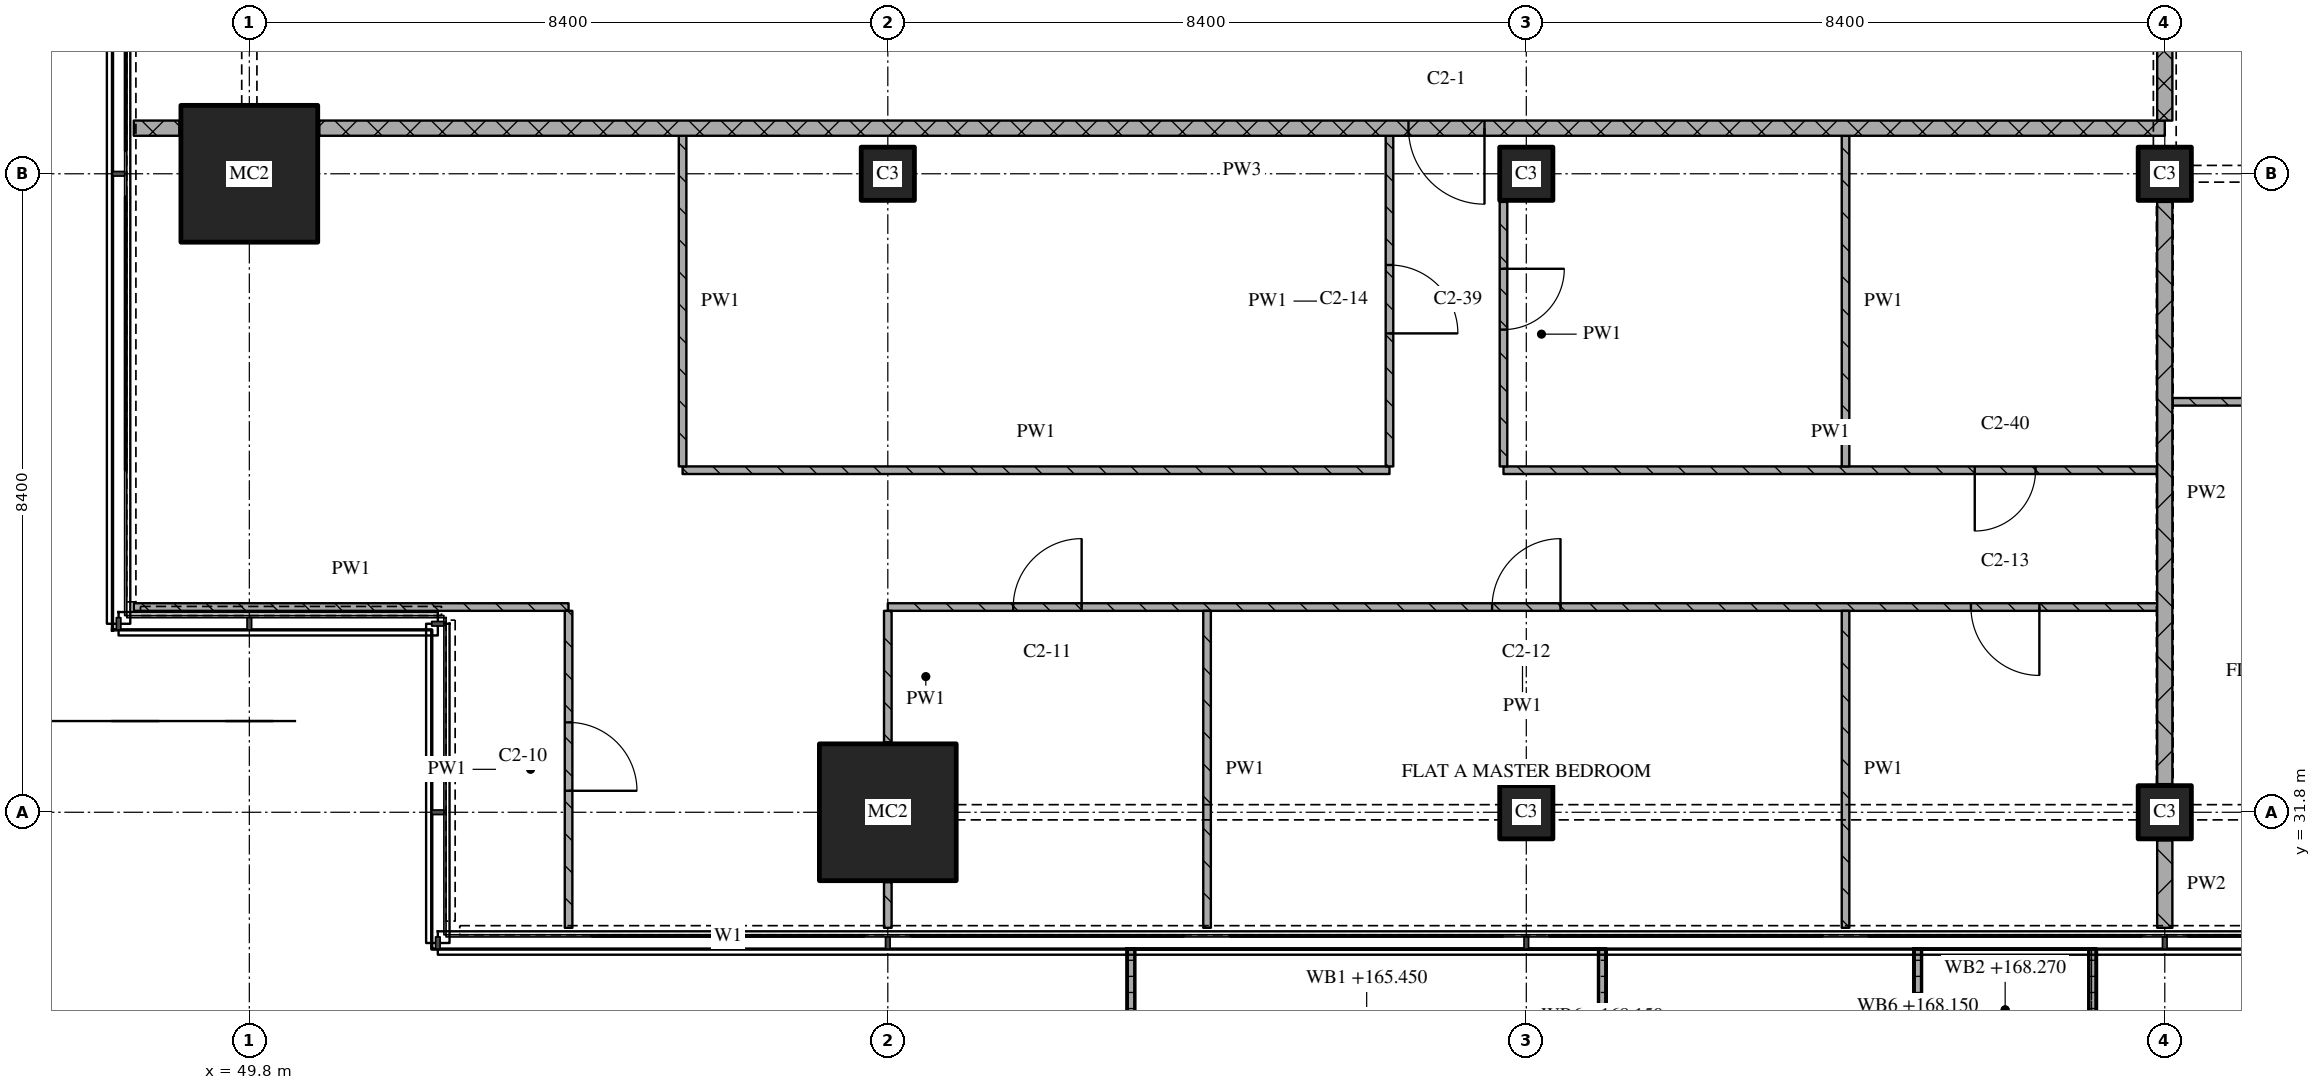
"""IFC4 building model, lengths in metres.
Left out: names, types, materials, properties, quantities, classifications, styles, units other than length and angle.
Written with IfcOpenShell. Run it as: python <this file> out.ifc"""

import sys

from ifc_helpers import new_model, si_unit, direction, frame, frame_2d, origin, origin_2d, place, context, subcontext, project, spatial, polyline, rectangle, outline, extrude, element, fill, save


model = new_model("IFC4")
c1 = context("Model", 3, precision=1e-05, world=origin(), true_north=direction((0.0, 1.0)))
c2 = subcontext(c1, "Body", "Model", "MODEL_VIEW")
j1 = project(units=[si_unit("LENGTHUNIT", "METRE"), si_unit("PLANEANGLEUNIT", "RADIAN")], contexts=[c1])
p1 = place(None, origin())
s1 = spatial("IfcSite", under=j1, at=p1, CompositionType="ELEMENT")
p2 = place(p1, origin())
s2 = spatial("IfcBuilding", under=s1, at=p2, CompositionType="ELEMENT")
p3 = place(p2, frame((0.0, 0.0, 165.45)))
s3 = spatial("IfcBuildingStorey", under=s2, at=p3, CompositionType="ELEMENT", Elevation=165.45)
for number, where, z_axis, x_axis in (
    (1, (49.8, 40.2, 0.0), (0.0, 0.0, 1.0), (1.0, 0.0, 0.0)),
    (2, (58.2, 31.8, 0.0), (0.0, 0.0, 1.0), (1.0, 0.0, 0.0)),
):
    element("IfcColumn", number, at=place(p3, frame(where, z_axis=z_axis, x_axis=x_axis)), inside=s3, PredefinedType="COLUMN", context=c2, shape_type="SweptSolid", body=[
        extrude(rectangle(XDim=1.8, YDim=1.8, at=origin_2d()), origin(), (0.0, 0.0, 1.0), 3.6),
    ])
for number, where, z_axis, x_axis in (
    (3, (58.2, 40.2, 0.0), (0.0, 0.0, 1.0), (1.0, 0.0, 0.0)),
    (4, (66.6, 31.8, 0.0), (0.0, 0.0, 1.0), (1.0, 0.0, 0.0)),
    (5, (66.6, 40.2, 0.0), (0.0, 0.0, 1.0), (1.0, 0.0, 0.0)),
    (6, (75.0, 31.8, 0.0), (0.0, 0.0, 1.0), (1.0, 0.0, 0.0)),
    (7, (75.0, 40.2, 0.0), (0.0, 0.0, 1.0), (1.0, 0.0, 0.0)),
):
    element("IfcColumn", number, at=place(p3, frame(where, z_axis=z_axis, x_axis=x_axis)), inside=s3, PredefinedType="COLUMN", context=c2, shape_type="SweptSolid", body=[
        extrude(rectangle(XDim=0.7, YDim=0.7, at=origin_2d()), origin(), (0.0, 0.0, 1.0), 3.6),
    ])
p4 = place(p3, origin())
e8 = element("IfcWall", 8, at=p4, inside=s3, PredefinedType="SOLIDWALL", context=c2, shape_type="SweptSolid", body=[
    extrude(outline(polyline([(61.35, 30.0), (61.45, 30.0), (61.45, 28.233), (67.55, 28.233), (67.55, 30.0), (67.65, 30.0), (67.65, 28.133), (61.35, 28.133), (61.35, 30.0)])), origin(), (0.0, 0.0, 1.0), 1.0),
])
p5 = place(p3, origin())
e9 = element("IfcWall", 9, at=p5, inside=s3, PredefinedType="SOLIDWALL", context=c2, shape_type="SweptSolid", body=[
    extrude(outline(polyline([(71.7, 30.0), (71.8, 30.0), (71.8, 28.5), (74.0, 28.5), (74.0, 30.0), (74.1, 30.0), (74.1, 28.4), (71.7, 28.4), (71.7, 30.0)])), origin(), (0.0, 0.0, 1.0), 1.0),
])
p6 = place(p3, frame((48.28, 34.5, 0.0), z_axis=(0.0, 0.0, 1.0), x_axis=(1.0, 0.0, 0.0)))
e10 = element("IfcWall", 10, at=p6, inside=s3, PredefinedType="PARTITIONING", context=c2, shape_type="SweptSolid", body=[
    extrude(rectangle(XDim=5.72, YDim=0.1, at=frame_2d((2.86, 0.0))), origin(), (0.0, 0.0, 1.0), 3.32),
])
p7 = place(p3, frame((74.9, 34.5, 0.0), z_axis=(0.0, 0.0, 1.0), x_axis=(-1.0, 0.0, 0.0)))
e11 = element("IfcWall", 11, at=p7, inside=s3, PredefinedType="PARTITIONING", context=c2, shape_type="SweptSolid", body=[
    extrude(rectangle(XDim=16.7, YDim=0.1, at=frame_2d((8.35, 0.0))), origin(), (0.0, 0.0, 1.0), 3.32),
])
p8 = place(p7, frame((1.55, 0.0, 0.0)))
e12 = element("IfcOpeningElement", 12, at=p8, cuts=e11, PredefinedType="OPENING", context=c2, shape_type="SweptSolid", body=[
    extrude(rectangle(XDim=0.9, YDim=2.1, at=frame_2d((0.45, 1.05))), frame((0.0, 0.06, 0.0), z_axis=(0.0, -1.0, 0.0), x_axis=(1.0, 0.0, 0.0)), (0.0, 0.0, 1.0), 0.12),
])
p9 = place(p7, frame((7.85, 0.0, 0.0)))
e13 = element("IfcOpeningElement", 13, at=p9, cuts=e11, PredefinedType="OPENING", context=c2, shape_type="SweptSolid", body=[
    extrude(rectangle(XDim=0.9, YDim=2.1, at=frame_2d((0.45, 1.05))), frame((0.0, 0.06, 0.0), z_axis=(0.0, -1.0, 0.0), x_axis=(1.0, 0.0, 0.0)), (0.0, 0.0, 1.0), 0.12),
])
p10 = place(p7, frame((14.15, 0.0, 0.0)))
e14 = element("IfcOpeningElement", 14, at=p10, cuts=e11, PredefinedType="OPENING", context=c2, shape_type="SweptSolid", body=[
    extrude(rectangle(XDim=0.9, YDim=2.1, at=frame_2d((0.45, 1.05))), frame((0.0, 0.06, 0.0), z_axis=(0.0, -1.0, 0.0), x_axis=(1.0, 0.0, 0.0)), (0.0, 0.0, 1.0), 0.12),
])
p11 = place(p3, frame((55.5, 36.3, 0.0), z_axis=(0.0, 0.0, 1.0), x_axis=(1.0, 0.0, 0.0)))
e15 = element("IfcWall", 15, at=p11, inside=s3, PredefinedType="PARTITIONING", context=c2, shape_type="SweptSolid", body=[
    extrude(rectangle(XDim=9.3, YDim=0.1, at=frame_2d((4.65, 0.0))), origin(), (0.0, 0.0, 1.0), 3.32),
])
p12 = place(p3, frame((66.3, 36.3, 0.0), z_axis=(0.0, 0.0, 1.0), x_axis=(1.0, 0.0, 0.0)))
e16 = element("IfcWall", 16, at=p12, inside=s3, PredefinedType="PARTITIONING", context=c2, shape_type="SweptSolid", body=[
    extrude(rectangle(XDim=8.6, YDim=0.1, at=frame_2d((4.3, 0.0))), origin(), (0.0, 0.0, 1.0), 3.32),
])
p13 = place(p12, frame((6.2, 0.0, 0.0)))
e17 = element("IfcOpeningElement", 17, at=p13, cuts=e16, PredefinedType="OPENING", context=c2, shape_type="SweptSolid", body=[
    extrude(rectangle(XDim=0.8, YDim=2.1, at=frame_2d((0.4, 1.05))), frame((0.0, 0.06, 0.0), z_axis=(0.0, -1.0, 0.0), x_axis=(1.0, 0.0, 0.0)), (0.0, 0.0, 1.0), 0.12),
])
p14 = place(p3, frame((75.1, 37.2, 0.0), z_axis=(0.0, 0.0, 1.0), x_axis=(1.0, 0.0, 0.0)))
e18 = element("IfcWall", 18, at=p14, inside=s3, PredefinedType="PARTITIONING", context=c2, shape_type="SweptSolid", body=[
    extrude(rectangle(XDim=11.3, YDim=0.1, at=frame_2d((5.65, 0.0))), origin(), (0.0, 0.0, 1.0), 3.32),
])
p15 = place(p14, frame((1.708, 0.0, 0.0)))
e19 = element("IfcOpeningElement", 19, at=p15, cuts=e18, PredefinedType="OPENING", context=c2, shape_type="SweptSolid", body=[
    extrude(rectangle(XDim=0.8, YDim=2.1, at=frame_2d((0.4, 1.05))), frame((0.0, 0.06, 0.0), z_axis=(0.0, -1.0, 0.0), x_axis=(1.0, 0.0, 0.0)), (0.0, 0.0, 1.0), 0.12),
])
p16 = place(p14, frame((6.125, 0.0, 0.0)))
e20 = element("IfcOpeningElement", 20, at=p16, cuts=e18, PredefinedType="OPENING", context=c2, shape_type="SweptSolid", body=[
    extrude(rectangle(XDim=0.8, YDim=2.1, at=frame_2d((0.4, 1.05))), frame((0.0, 0.06, 0.0), z_axis=(0.0, -1.0, 0.0), x_axis=(1.0, 0.0, 0.0)), (0.0, 0.0, 1.0), 0.12),
])
p17 = place(p14, frame((9.567, 0.0, 0.0)))
e21 = element("IfcOpeningElement", 21, at=p17, cuts=e18, PredefinedType="OPENING", context=c2, shape_type="SweptSolid", body=[
    extrude(rectangle(XDim=0.9, YDim=2.1, at=frame_2d((0.45, 1.05))), frame((0.0, 0.06, 0.0), z_axis=(0.0, -1.0, 0.0), x_axis=(1.0, 0.0, 0.0)), (0.0, 0.0, 1.0), 0.12),
])
p18 = place(p3, frame((48.28, 40.8, 0.0), z_axis=(0.0, 0.0, 1.0), x_axis=(1.0, 0.0, 0.0)))
e22 = element("IfcWall", 22, at=p18, inside=s3, PredefinedType="PARTITIONING", context=c2, shape_type="SweptSolid", body=[
    extrude(rectangle(XDim=0.6, YDim=0.2, at=frame_2d((0.3, 0.0))), origin(), (0.0, 0.0, 1.0), 3.32),
])
p19 = place(p3, frame((75.0, 40.8, 0.0), z_axis=(0.0, 0.0, 1.0), x_axis=(-1.0, 0.0, 0.0)))
e23 = element("IfcWall", 23, at=p19, inside=s3, PredefinedType="PARTITIONING", context=c2, shape_type="SweptSolid", body=[
    extrude(rectangle(XDim=24.28, YDim=0.2, at=frame_2d((12.14, 0.0))), origin(), (0.0, 0.0, 1.0), 3.32),
])
p20 = place(p19, frame((8.95, 0.0, 0.0)))
e24 = element("IfcOpeningElement", 24, at=p20, cuts=e23, PredefinedType="OPENING", context=c2, shape_type="SweptSolid", body=[
    extrude(rectangle(XDim=1.0, YDim=2.1, at=frame_2d((0.5, 1.05))), frame((0.0, 0.11, 0.0), z_axis=(0.0, -1.0, 0.0), x_axis=(1.0, 0.0, 0.0)), (0.0, 0.0, 1.0), 0.22),
])
p21 = place(p3, frame((54.0, 30.28, 0.0), z_axis=(0.0, 0.0, 1.0), x_axis=(0.0, 1.0, 0.0)))
e25 = element("IfcWall", 25, at=p21, inside=s3, PredefinedType="PARTITIONING", context=c2, shape_type="SweptSolid", body=[
    extrude(rectangle(XDim=4.17, YDim=0.1, at=frame_2d((2.085, 0.0))), origin(), (0.0, 0.0, 1.0), 3.32),
])
p22 = place(p21, frame((1.803, 0.0, 0.0)))
e26 = element("IfcOpeningElement", 26, at=p22, cuts=e25, PredefinedType="OPENING", context=c2, shape_type="SweptSolid", body=[
    extrude(rectangle(XDim=0.9, YDim=2.1, at=frame_2d((0.45, 1.05))), frame((0.0, 0.06, 0.0), z_axis=(0.0, -1.0, 0.0), x_axis=(1.0, 0.0, 0.0)), (0.0, 0.0, 1.0), 0.12),
])
p23 = place(p3, frame((55.5, 40.7, 0.0), z_axis=(0.0, 0.0, 1.0), x_axis=(0.0, -1.0, 0.0)))
e27 = element("IfcWall", 27, at=p23, inside=s3, PredefinedType="PARTITIONING", context=c2, shape_type="SweptSolid", body=[
    extrude(rectangle(XDim=4.35, YDim=0.1, at=frame_2d((2.175, 0.0))), origin(), (0.0, 0.0, 1.0), 3.32),
])
p24 = place(p3, frame((58.2, 30.88, 0.0), z_axis=(0.0, 0.0, 1.0), x_axis=(0.0, -1.0, 0.0)))
e28 = element("IfcWall", 28, at=p24, inside=s3, PredefinedType="PARTITIONING", context=c2, shape_type="SweptSolid", body=[
    extrude(rectangle(XDim=0.6, YDim=0.1, at=frame_2d((0.3, 0.0))), origin(), (0.0, 0.0, 1.0), 3.32),
])
p25 = place(p3, frame((58.2, 34.45, 0.0), z_axis=(0.0, 0.0, 1.0), x_axis=(0.0, -1.0, 0.0)))
e29 = element("IfcWall", 29, at=p25, inside=s3, PredefinedType="PARTITIONING", context=c2, shape_type="SweptSolid", body=[
    extrude(rectangle(XDim=1.73, YDim=0.1, at=frame_2d((0.865, 0.0))), origin(), (0.0, 0.0, 1.0), 3.32),
])
p26 = place(p3, frame((62.4, 34.45, 0.0), z_axis=(0.0, 0.0, 1.0), x_axis=(0.0, -1.0, 0.0)))
e30 = element("IfcWall", 30, at=p26, inside=s3, PredefinedType="PARTITIONING", context=c2, shape_type="SweptSolid", body=[
    extrude(rectangle(XDim=4.17, YDim=0.1, at=frame_2d((2.085, 0.0))), origin(), (0.0, 0.0, 1.0), 3.32),
])
p27 = place(p3, frame((64.8, 36.35, 0.0), z_axis=(0.0, 0.0, 1.0), x_axis=(0.0, 1.0, 0.0)))
e31 = element("IfcWall", 31, at=p27, inside=s3, PredefinedType="PARTITIONING", context=c2, shape_type="SweptSolid", body=[
    extrude(rectangle(XDim=4.35, YDim=0.1, at=frame_2d((2.175, 0.0))), origin(), (0.0, 0.0, 1.0), 3.32),
])
p28 = place(p27, frame((1.75, 0.0, 0.0)))
e32 = element("IfcOpeningElement", 32, at=p28, cuts=e31, PredefinedType="OPENING", context=c2, shape_type="SweptSolid", body=[
    extrude(rectangle(XDim=0.9, YDim=2.1, at=frame_2d((0.45, 1.05))), frame((0.0, 0.06, 0.0), z_axis=(0.0, -1.0, 0.0), x_axis=(1.0, 0.0, 0.0)), (0.0, 0.0, 1.0), 0.12),
])
p29 = place(p3, frame((66.3, 39.83, 0.0), z_axis=(0.0, 0.0, 1.0), x_axis=(0.0, -1.0, 0.0)))
e33 = element("IfcWall", 33, at=p29, inside=s3, PredefinedType="PARTITIONING", context=c2, shape_type="SweptSolid", body=[
    extrude(rectangle(XDim=3.48, YDim=0.1, at=frame_2d((1.74, 0.0))), origin(), (0.0, 0.0, 1.0), 3.32),
])
p30 = place(p29, frame((0.88, 0.0, 0.0)))
e34 = element("IfcOpeningElement", 34, at=p30, cuts=e33, PredefinedType="OPENING", context=c2, shape_type="SweptSolid", body=[
    extrude(rectangle(XDim=0.8, YDim=2.1, at=frame_2d((0.4, 1.05))), frame((0.0, 0.06, 0.0), z_axis=(0.0, -1.0, 0.0), x_axis=(1.0, 0.0, 0.0)), (0.0, 0.0, 1.0), 0.12),
])
p31 = place(p3, frame((70.8, 34.45, 0.0), z_axis=(0.0, 0.0, 1.0), x_axis=(0.0, -1.0, 0.0)))
e35 = element("IfcWall", 35, at=p31, inside=s3, PredefinedType="PARTITIONING", context=c2, shape_type="SweptSolid", body=[
    extrude(rectangle(XDim=4.17, YDim=0.1, at=frame_2d((2.085, 0.0))), origin(), (0.0, 0.0, 1.0), 3.32),
])
p32 = place(p3, frame((70.8, 40.7, 0.0), z_axis=(0.0, 0.0, 1.0), x_axis=(0.0, -1.0, 0.0)))
e36 = element("IfcWall", 36, at=p32, inside=s3, PredefinedType="PARTITIONING", context=c2, shape_type="SweptSolid", body=[
    extrude(rectangle(XDim=4.35, YDim=0.1, at=frame_2d((2.175, 0.0))), origin(), (0.0, 0.0, 1.0), 3.32),
])
p33 = place(p3, frame((75.0, 43.1, 0.0), z_axis=(0.0, 0.0, 1.0), x_axis=(0.0, -1.0, 0.0)))
e37 = element("IfcWall", 37, at=p33, inside=s3, PredefinedType="PARTITIONING", context=c2, shape_type="SweptSolid", body=[
    extrude(rectangle(XDim=2.2, YDim=0.2, at=frame_2d((1.1, 0.0))), origin(), (0.0, 0.0, 1.0), 2.43),
])
p34 = place(p3, frame((75.0, 31.43, 0.0), z_axis=(0.0, 0.0, 1.0), x_axis=(0.0, -1.0, 0.0)))
e38 = element("IfcWall", 38, at=p34, inside=s3, PredefinedType="PARTITIONING", context=c2, shape_type="SweptSolid", body=[
    extrude(rectangle(XDim=1.15, YDim=0.2, at=frame_2d((0.575, 0.0))), origin(), (0.0, 0.0, 1.0), 3.32),
])
p35 = place(p3, frame((75.0, 39.83, 0.0), z_axis=(0.0, 0.0, 1.0), x_axis=(0.0, -1.0, 0.0)))
e39 = element("IfcWall", 39, at=p35, inside=s3, PredefinedType="PARTITIONING", context=c2, shape_type="SweptSolid", body=[
    extrude(rectangle(XDim=7.66, YDim=0.2, at=frame_2d((3.83, 0.0))), origin(), (0.0, 0.0, 1.0), 2.72),
])
p36 = place(p8, origin())
e40 = element("IfcDoor", 40, at=p36, inside=s3, OperationType="SINGLE_SWING_LEFT", PredefinedType="DOOR", context=c2, shape_type="SweptSolid", body=[
    extrude(rectangle(XDim=0.9, YDim=2.1, at=frame_2d((0.45, 1.05))), frame((0.0, 0.025, 0.0), z_axis=(0.0, -1.0, 0.0), x_axis=(1.0, 0.0, 0.0)), (0.0, 0.0, 1.0), 0.05),
])
fill(e12, e40)
p37 = place(p9, origin())
e41 = element("IfcDoor", 41, at=p37, inside=s3, OperationType="SINGLE_SWING_RIGHT", PredefinedType="DOOR", context=c2, shape_type="SweptSolid", body=[
    extrude(rectangle(XDim=0.9, YDim=2.1, at=frame_2d((0.45, 1.05))), frame((0.0, 0.025, 0.0), z_axis=(0.0, -1.0, 0.0), x_axis=(1.0, 0.0, 0.0)), (0.0, 0.0, 1.0), 0.05),
])
fill(e13, e41)
p38 = place(p10, origin())
e42 = element("IfcDoor", 42, at=p38, inside=s3, OperationType="SINGLE_SWING_RIGHT", PredefinedType="DOOR", context=c2, shape_type="SweptSolid", body=[
    extrude(rectangle(XDim=0.9, YDim=2.1, at=frame_2d((0.45, 1.05))), frame((0.0, 0.025, 0.0), z_axis=(0.0, -1.0, 0.0), x_axis=(1.0, 0.0, 0.0)), (0.0, 0.0, 1.0), 0.05),
])
fill(e14, e42)
p39 = place(p13, origin())
e43 = element("IfcDoor", 43, at=p39, inside=s3, OperationType="SINGLE_SWING_RIGHT", PredefinedType="DOOR", context=c2, shape_type="SweptSolid", body=[
    extrude(rectangle(XDim=0.8, YDim=2.1, at=frame_2d((0.4, 1.05))), frame((0.0, 0.025, 0.0), z_axis=(0.0, -1.0, 0.0), x_axis=(1.0, 0.0, 0.0)), (0.0, 0.0, 1.0), 0.05),
])
fill(e17, e43)
p40 = place(p20, origin())
e44 = element("IfcDoor", 44, at=p40, inside=s3, OperationType="SINGLE_SWING_LEFT", PredefinedType="DOOR", context=c2, shape_type="SweptSolid", body=[
    extrude(rectangle(XDim=1.0, YDim=2.1, at=frame_2d((0.5, 1.05))), frame((0.0, 0.025, 0.0), z_axis=(0.0, -1.0, 0.0), x_axis=(1.0, 0.0, 0.0)), (0.0, 0.0, 1.0), 0.05),
])
fill(e24, e44)
p41 = place(p22, origin())
e45 = element("IfcDoor", 45, at=p41, inside=s3, OperationType="SINGLE_SWING_RIGHT", PredefinedType="DOOR", context=c2, shape_type="SweptSolid", body=[
    extrude(rectangle(XDim=0.9, YDim=2.1, at=frame_2d((0.45, 1.05))), frame((0.0, 0.025, 0.0), z_axis=(0.0, -1.0, 0.0), x_axis=(1.0, 0.0, 0.0)), (0.0, 0.0, 1.0), 0.05),
])
fill(e26, e45)
p42 = place(p28, origin())
e46 = element("IfcDoor", 46, at=p42, inside=s3, OperationType="SINGLE_SWING_RIGHT", PredefinedType="DOOR", context=c2, shape_type="SweptSolid", body=[
    extrude(rectangle(XDim=0.9, YDim=2.1, at=frame_2d((0.45, 1.05))), frame((0.0, 0.025, 0.0), z_axis=(0.0, -1.0, 0.0), x_axis=(1.0, 0.0, 0.0)), (0.0, 0.0, 1.0), 0.05),
])
fill(e32, e46)
p43 = place(p30, origin())
e47 = element("IfcDoor", 47, at=p43, inside=s3, OperationType="SINGLE_SWING_LEFT", PredefinedType="DOOR", context=c2, shape_type="SweptSolid", body=[
    extrude(rectangle(XDim=0.8, YDim=2.1, at=frame_2d((0.4, 1.05))), frame((0.0, 0.025, 0.0), z_axis=(0.0, -1.0, 0.0), x_axis=(1.0, 0.0, 0.0)), (0.0, 0.0, 1.0), 0.05),
])
fill(e34, e47)
save(model, sys.argv[1])
